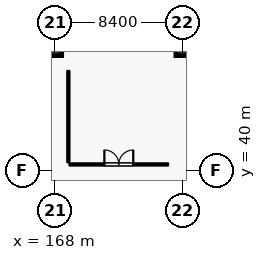
"""IFC4 building model, lengths in metres.
Left out: names, types, materials, properties, quantities, classifications, styles, units other than length and angle.
Written with IfcOpenShell. Run it as: python <this file> out.ifc"""

import sys

from ifc_helpers import new_model, si_unit, direction, frame, frame_2d, origin, origin_2d, place, context, subcontext, project, spatial, rectangle, circle, extrude, element, fill, save


model = new_model("IFC4")
c1 = context("Model", 3, precision=1e-05, world=origin(), true_north=direction((0.0, 1.0)))
c2 = subcontext(c1, "Body", "Model", "MODEL_VIEW")
j1 = project(units=[si_unit("LENGTHUNIT", "METRE"), si_unit("PLANEANGLEUNIT", "RADIAN")], contexts=[c1])
p1 = place(None, origin())
s1 = spatial("IfcSite", under=j1, at=p1, CompositionType="ELEMENT")
p2 = place(p1, origin())
s2 = spatial("IfcBuilding", under=s1, at=p2, CompositionType="ELEMENT")
p3 = place(p2, frame((0.0, 0.0, 6.0)))
s3 = spatial("IfcBuildingStorey", under=s2, at=p3, CompositionType="ELEMENT", Elevation=6.0)
for number, where, z_axis, x_axis in (
    (1, (168.0, 48.0, 0.0), (0.0, 0.0, 1.0), (1.0, 0.0, 0.0)),
    (2, (176.4, 48.0, 0.0), (0.0, 0.0, 1.0), (1.0, 0.0, 0.0)),
):
    element("IfcColumn", number, at=place(p3, frame(where, z_axis=z_axis, x_axis=x_axis)), inside=s3, PredefinedType="COLUMN", context=c2, shape_type="SweptSolid", body=[
        extrude(circle(Radius=0.45, at=origin_2d()), origin(), (0.0, 0.0, 1.0), 5.4),
    ])
p4 = place(p3, frame((168.96, 40.4, 0.0), z_axis=(0.0, 0.0, 1.0), x_axis=(1.0, 0.0, 0.0)))
e3 = element("IfcWall", 3, at=p4, inside=s3, PredefinedType="PARTITIONING", context=c2, shape_type="SweptSolid", body=[
    extrude(rectangle(XDim=6.48, YDim=0.14, at=frame_2d((3.24, 0.0))), origin(), (0.0, 0.0, 1.0), 5.045),
])
p5 = place(p4, frame((2.29, 0.0, 0.0)))
e4 = element("IfcOpeningElement", 4, at=p5, cuts=e3, PredefinedType="OPENING", context=c2, shape_type="SweptSolid", body=[
    extrude(rectangle(XDim=1.9, YDim=2.4, at=frame_2d((0.95, 1.2))), frame((0.0, 0.08, 0.0), z_axis=(0.0, -1.0, 0.0), x_axis=(1.0, 0.0, 0.0)), (0.0, 0.0, 1.0), 0.16),
])
p6 = place(p3, frame((168.88, 40.54, 0.0), z_axis=(0.0, 0.0, 1.0), x_axis=(0.0, 1.0, 0.0)))
e5 = element("IfcWall", 5, at=p6, inside=s3, PredefinedType="PARTITIONING", context=c2, shape_type="SweptSolid", body=[
    extrude(rectangle(XDim=6.01, YDim=0.14, at=frame_2d((3.005, 0.0))), origin(), (0.0, 0.0, 1.0), 5.045),
])
p7 = place(p5, origin())
e6 = element("IfcDoor", 6, at=p7, inside=s3, OperationType="DOUBLE_DOOR_SINGLE_SWING", PredefinedType="DOOR", context=c2, shape_type="SweptSolid", body=[
    extrude(rectangle(XDim=1.9, YDim=2.4, at=frame_2d((0.95, 1.2))), frame((0.0, 0.025, 0.0), z_axis=(0.0, -1.0, 0.0), x_axis=(1.0, 0.0, 0.0)), (0.0, 0.0, 1.0), 0.05),
])
fill(e4, e6)
save(model, sys.argv[1])
